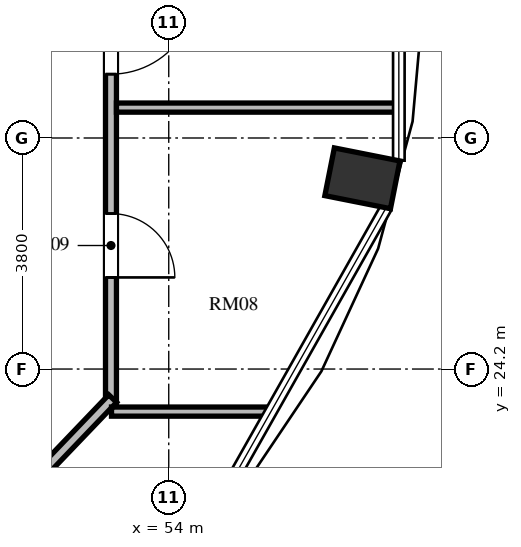
"""IFC4 building model, lengths in metres.
Left out: names, types, materials, properties, quantities, classifications, styles, units other than length and angle.
Written with IfcOpenShell. Run it as: python <this file> out.ifc"""

import sys

from ifc_helpers import new_model, si_unit, direction, frame, frame_2d, origin, origin_2d, place, context, subcontext, project, spatial, rectangle, extrude, element, fill, save


model = new_model("IFC4")
c1 = context("Model", 3, precision=1e-05, world=origin(), true_north=direction((0.0, 1.0)))
c2 = subcontext(c1, "Body", "Model", "MODEL_VIEW")
j1 = project(units=[si_unit("LENGTHUNIT", "METRE"), si_unit("PLANEANGLEUNIT", "RADIAN")], contexts=[c1])
p1 = place(None, origin())
s1 = spatial("IfcSite", under=j1, at=p1, CompositionType="ELEMENT")
p2 = place(p1, origin())
s2 = spatial("IfcBuilding", under=s1, at=p2, CompositionType="ELEMENT")
p3 = place(p2, frame((0.0, 0.0, 220.368)))
s3 = spatial("IfcBuildingStorey", under=s2, at=p3, CompositionType="ELEMENT", Elevation=220.368)
p4 = place(p3, frame((57.185, 27.337, 0.0), z_axis=(0.0, 0.0, 1.0), x_axis=(0.980785280403, -0.195090322016, 0.0)))
e1 = element("IfcColumn", 1, at=p4, inside=s3, PredefinedType="COLUMN", context=c2, shape_type="SweptSolid", body=[
    extrude(rectangle(XDim=1.1, YDim=0.8, at=origin_2d()), origin(), (0.0, 0.0, 1.0), 3.648),
])
p5 = place(p3, frame((53.05, 37.155, 0.0), z_axis=(0.0, 0.0, 1.0), x_axis=(0.0, -1.0, 0.0)))
e2 = element("IfcWall", 2, at=p5, inside=s3, PredefinedType="PARTITIONING", context=c2, shape_type="SweptSolid", body=[
    extrude(rectangle(XDim=13.509, YDim=0.18, at=frame_2d((6.754, 0.0))), origin(), (0.0, 0.0, 1.0), 3.448),
])
p6 = place(p5, frame((10.398, 0.0, 0.0)))
e3 = element("IfcOpeningElement", 3, at=p6, cuts=e2, PredefinedType="OPENING", context=c2, shape_type="SweptSolid", body=[
    extrude(rectangle(XDim=1.05, YDim=2.15, at=frame_2d((0.525, 1.075))), frame((0.0, 0.1, 0.0), z_axis=(0.0, -1.0, 0.0), x_axis=(1.0, 0.0, 0.0)), (0.0, 0.0, 1.0), 0.2),
])
p7 = place(p5, frame((6.705, 0.0, 0.0)))
e4 = element("IfcOpeningElement", 4, at=p7, cuts=e2, PredefinedType="OPENING", context=c2, shape_type="SweptSolid", body=[
    extrude(rectangle(XDim=1.4, YDim=2.2, at=frame_2d((0.7, 1.1))), frame((0.0, 0.1, 0.0), z_axis=(0.0, -1.0, 0.0), x_axis=(1.0, 0.0, 0.0)), (0.0, 0.0, 1.0), 0.2),
])
p8 = place(p5, frame((4.375, 0.0, 0.0)))
e5 = element("IfcOpeningElement", 5, at=p8, cuts=e2, PredefinedType="OPENING", context=c2, shape_type="SweptSolid", body=[
    extrude(rectangle(XDim=1.05, YDim=2.15, at=frame_2d((0.525, 1.075))), frame((0.0, 0.1, 0.0), z_axis=(0.0, -1.0, 0.0), x_axis=(1.0, 0.0, 0.0)), (0.0, 0.0, 1.0), 0.2),
])
p9 = place(p3, frame((53.078, 23.714, 0.0), z_axis=(0.0, 0.0, 1.0), x_axis=(-0.691353379446, -0.722516785085, 0.0)))
e6 = element("IfcWall", 6, at=p9, inside=s3, PredefinedType="PARTITIONING", context=c2, shape_type="SweptSolid", body=[
    extrude(rectangle(XDim=3.604, YDim=0.18, at=frame_2d((1.802, 0.0))), origin(), (0.0, 0.0, 1.0), 3.448),
])
p10 = place(p3, frame((53.059, 23.5, 0.0), z_axis=(0.0, 0.0, 1.0), x_axis=(1.0, 0.0, 0.0)))
e7 = element("IfcWall", 7, at=p10, inside=s3, PredefinedType="PARTITIONING", context=c2, shape_type="SweptSolid", body=[
    extrude(rectangle(XDim=2.612, YDim=0.15, at=frame_2d((1.306, 0.0))), origin(), (0.0, 0.0, 1.0), 3.448),
])
p11 = place(p3, frame((53.14, 28.5, 0.0), z_axis=(0.0, 0.0, 1.0), x_axis=(1.0, 0.0, 0.0)))
e8 = element("IfcWall", 8, at=p11, inside=s3, PredefinedType="PARTITIONING", context=c2, shape_type="SweptSolid", body=[
    extrude(rectangle(XDim=4.632, YDim=0.15, at=frame_2d((2.316, 0.0))), origin(), (0.0, 0.0, 1.0), 3.448),
])
p12 = place(p6, origin())
e9 = element("IfcDoor", 9, at=p12, inside=s3, OperationType="SINGLE_SWING_RIGHT", PredefinedType="DOOR", context=c2, shape_type="SweptSolid", body=[
    extrude(rectangle(XDim=1.05, YDim=2.15, at=frame_2d((0.525, 1.075))), frame((0.0, 0.025, 0.0), z_axis=(0.0, -1.0, 0.0), x_axis=(1.0, 0.0, 0.0)), (0.0, 0.0, 1.0), 0.05),
])
fill(e3, e9)
p13 = place(p7, origin())
e10 = element("IfcDoor", 10, at=p13, inside=s3, OperationType="SINGLE_SWING_LEFT", PredefinedType="DOOR", context=c2, shape_type="SweptSolid", body=[
    extrude(rectangle(XDim=1.4, YDim=2.2, at=frame_2d((0.7, 1.1))), frame((0.0, 0.025, 0.0), z_axis=(0.0, -1.0, 0.0), x_axis=(1.0, 0.0, 0.0)), (0.0, 0.0, 1.0), 0.05),
])
fill(e4, e10)
save(model, sys.argv[1])
